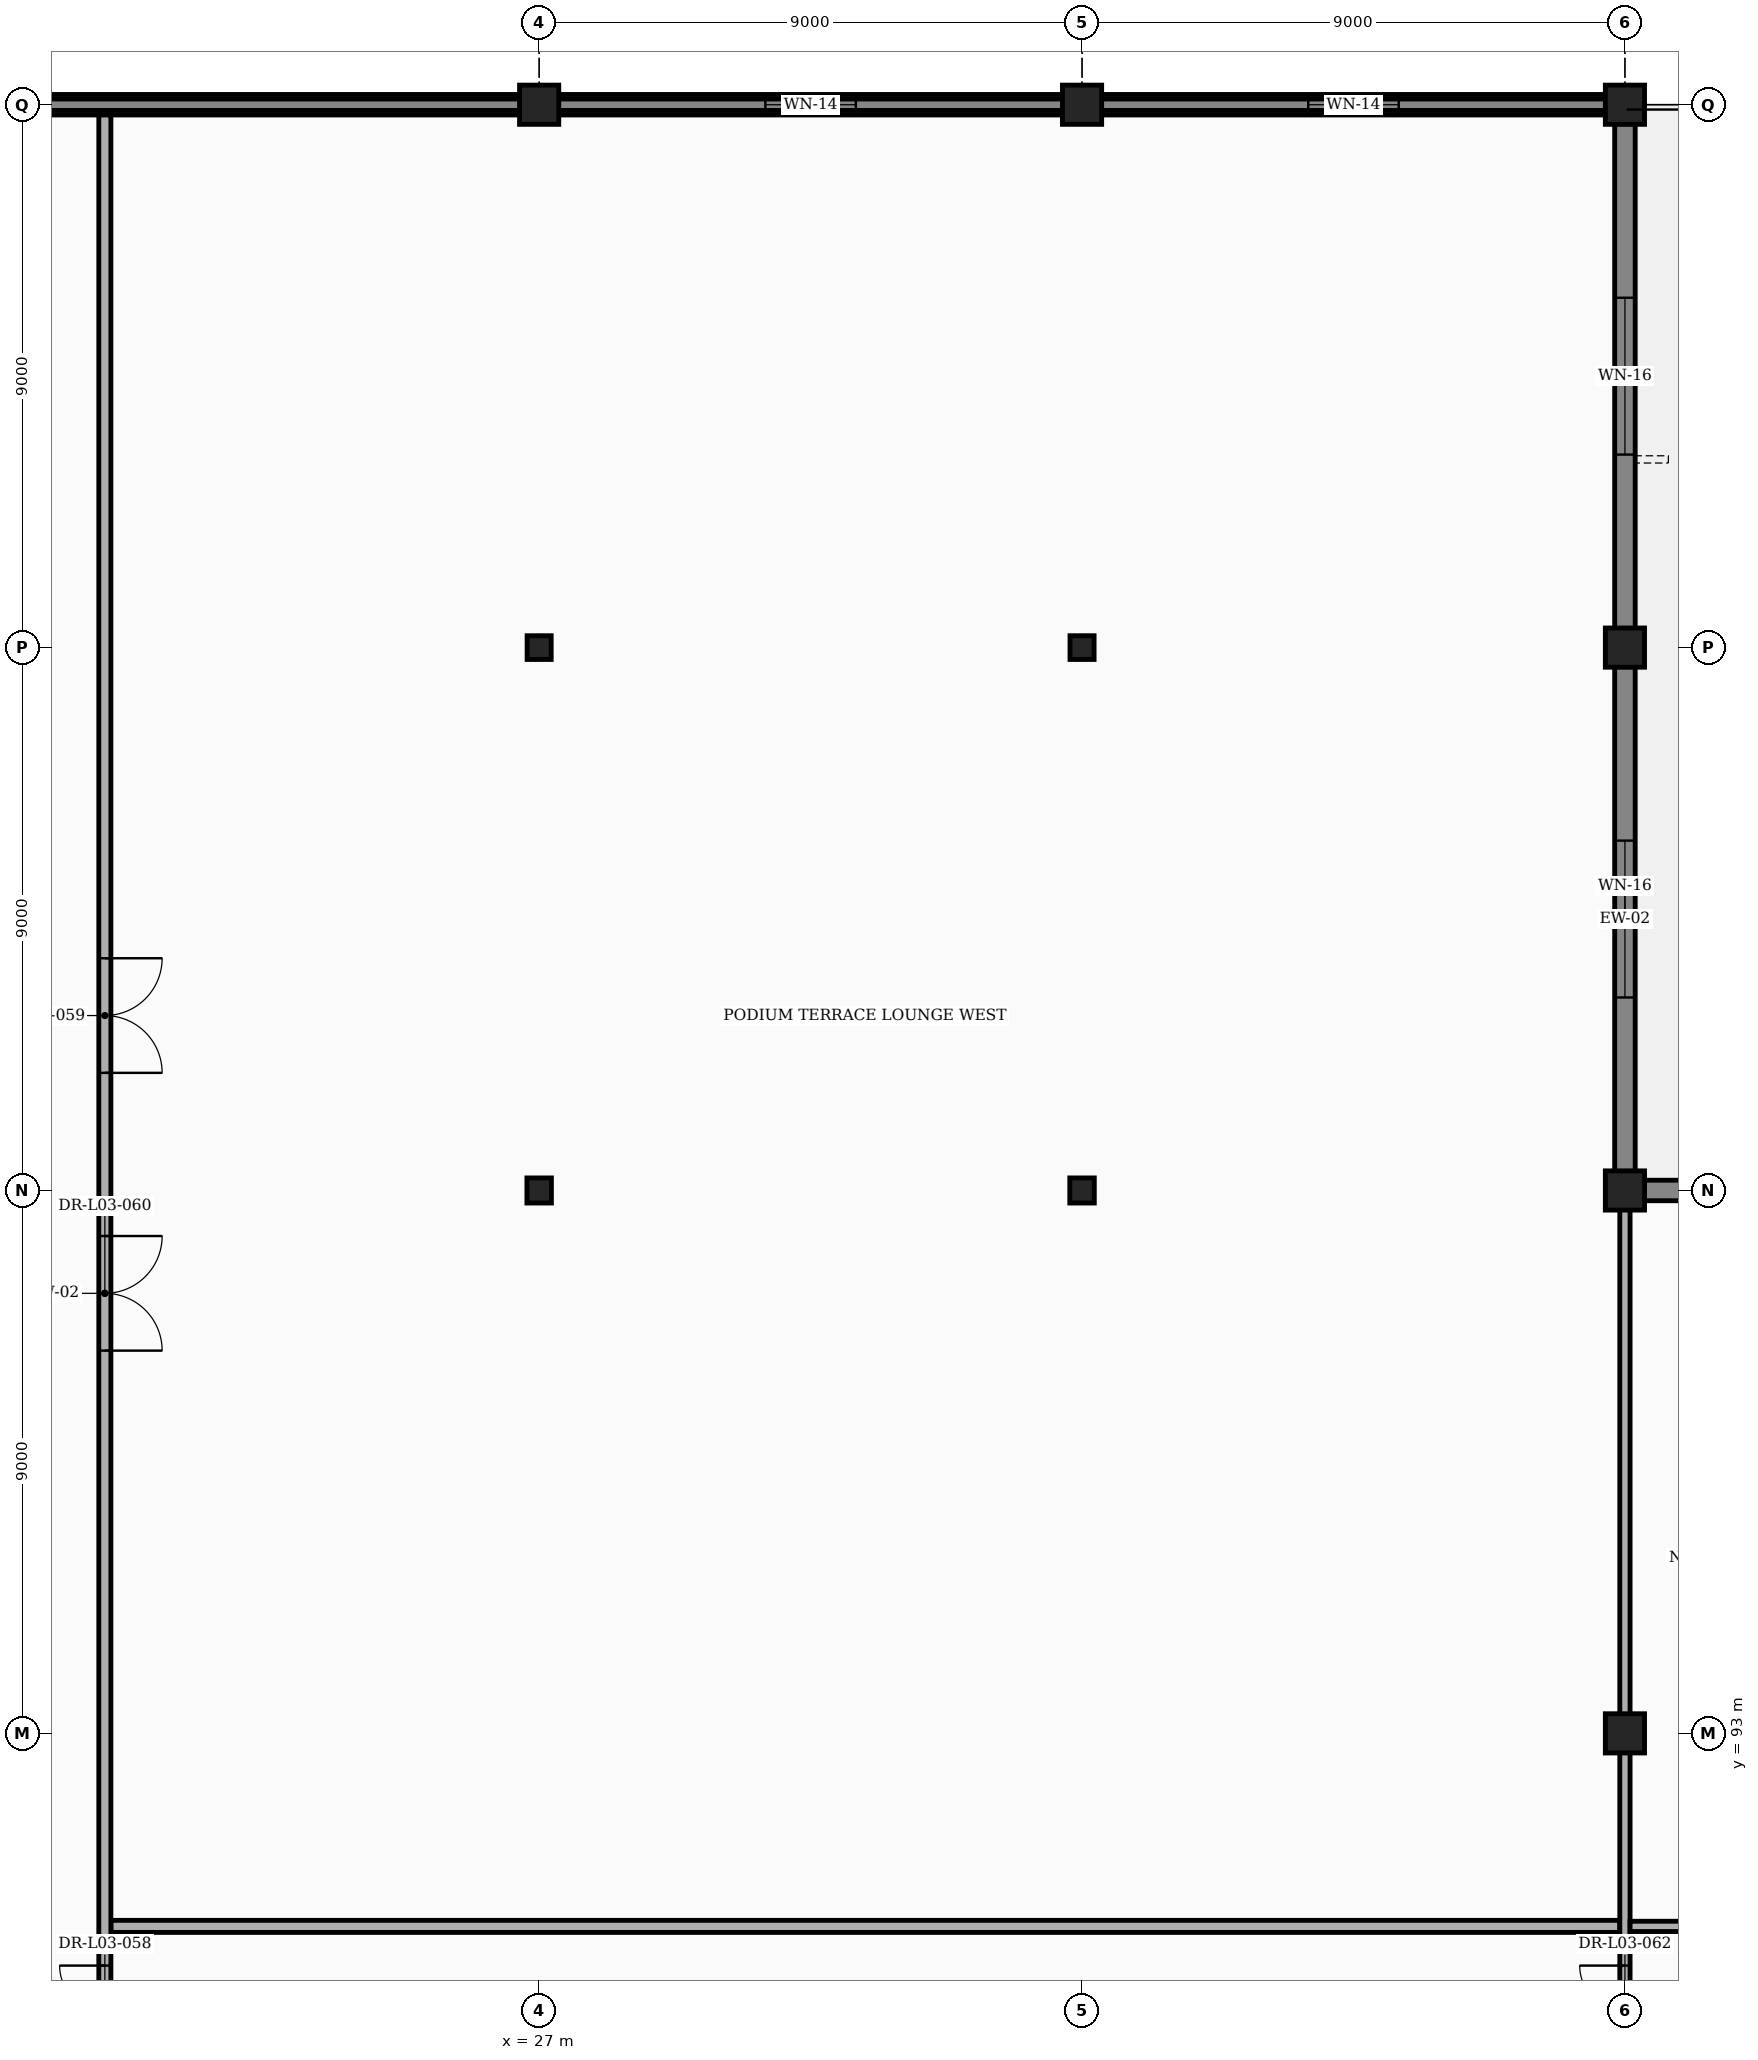
"""IFC4 building model, lengths in metres.
Left out: names, types, materials, properties, quantities, classifications, styles, units other than length and angle.
Written with IfcOpenShell. Run it as: python <this file> out.ifc"""

import sys

from ifc_helpers import new_model, si_unit, direction, frame, frame_2d, origin, origin_2d, place, context, subcontext, project, spatial, rectangle, i_section, extrude, element, fill, save


model = new_model("IFC4")
c1 = context("Model", 3, precision=1e-05, world=origin(), true_north=direction((0.0, 1.0)))
c2 = subcontext(c1, "Body", "Model", "MODEL_VIEW")
j1 = project(units=[si_unit("LENGTHUNIT", "METRE"), si_unit("PLANEANGLEUNIT", "RADIAN")], contexts=[c1])
p1 = place(None, origin())
s1 = spatial("IfcSite", under=j1, at=p1, CompositionType="ELEMENT")
p2 = place(p1, origin())
s2 = spatial("IfcBuilding", under=s1, at=p2, CompositionType="ELEMENT")
p3 = place(p2, frame((0.0, 0.0, 16.8)))
s3 = spatial("IfcBuildingStorey", under=s2, at=p3, CompositionType="ELEMENT", Elevation=16.8)
p4 = place(p3, frame((27.0, 102.0, 0.0), z_axis=(0.0, 0.0, 1.0), x_axis=(1.0, 0.0, 0.0)))
e1 = element("IfcColumn", 1, at=p4, inside=s3, PredefinedType="COLUMN", context=c2, shape_type="SweptSolid", body=[
    extrude(i_section(OverallWidth=0.406, OverallDepth=0.416, WebThickness=0.03, FlangeThickness=0.048, at=origin_2d()), origin(), (0.0, 0.0, 1.0), 4.8),
])
p5 = place(p3, frame((27.0, 111.0, 0.0), z_axis=(0.0, 0.0, 1.0), x_axis=(1.0, 0.0, 0.0)))
e2 = element("IfcColumn", 2, at=p5, inside=s3, PredefinedType="COLUMN", context=c2, shape_type="SweptSolid", body=[
    extrude(i_section(OverallWidth=0.399, OverallDepth=0.394, WebThickness=0.023, FlangeThickness=0.037, at=origin_2d()), origin(), (0.0, 0.0, 1.0), 4.8),
])
p6 = place(p3, frame((27.0, 120.0, 0.0), z_axis=(0.0, 0.0, 1.0), x_axis=(1.0, 0.0, 0.0)))
e3 = element("IfcColumn", 3, at=p6, inside=s3, PredefinedType="COLUMN", context=c2, shape_type="SweptSolid", body=[
    extrude(rectangle(XDim=0.65, YDim=0.65, at=origin_2d()), origin(), (0.0, 0.0, 1.0), 4.8),
])
p7 = place(p3, frame((36.0, 102.0, 0.0), z_axis=(0.0, 0.0, 1.0), x_axis=(1.0, 0.0, 0.0)))
e4 = element("IfcColumn", 4, at=p7, inside=s3, PredefinedType="COLUMN", context=c2, shape_type="SweptSolid", body=[
    extrude(i_section(OverallWidth=0.406, OverallDepth=0.416, WebThickness=0.03, FlangeThickness=0.048, at=origin_2d()), origin(), (0.0, 0.0, 1.0), 4.8),
])
p8 = place(p3, frame((36.0, 111.0, 0.0), z_axis=(0.0, 0.0, 1.0), x_axis=(1.0, 0.0, 0.0)))
e5 = element("IfcColumn", 5, at=p8, inside=s3, PredefinedType="COLUMN", context=c2, shape_type="SweptSolid", body=[
    extrude(i_section(OverallWidth=0.399, OverallDepth=0.394, WebThickness=0.023, FlangeThickness=0.037, at=origin_2d()), origin(), (0.0, 0.0, 1.0), 4.8),
])
for number, where, z_axis, x_axis in (
    (6, (36.0, 120.0, 0.0), (0.0, 0.0, 1.0), (1.0, 0.0, 0.0)),
    (7, (45.0, 93.0, 0.0), (0.0, 0.0, 1.0), (1.0, 0.0, 0.0)),
    (8, (45.0, 102.0, 0.0), (0.0, 0.0, 1.0), (1.0, 0.0, 0.0)),
    (9, (45.0, 111.0, 0.0), (0.0, 0.0, 1.0), (1.0, 0.0, 0.0)),
    (10, (45.0, 120.0, 0.0), (0.0, 0.0, 1.0), (1.0, 0.0, 0.0)),
):
    element("IfcColumn", number, at=place(p3, frame(where, z_axis=z_axis, x_axis=x_axis)), inside=s3, PredefinedType="COLUMN", context=c2, shape_type="SweptSolid", body=[
        extrude(rectangle(XDim=0.65, YDim=0.65, at=origin_2d()), origin(), (0.0, 0.0, 1.0), 4.8),
    ])
p9 = place(p3, frame((45.317, 102.0, 0.0), z_axis=(0.0, 0.0, 1.0), x_axis=(1.0, 0.0, 0.0)))
e11 = element("IfcWall", 11, at=p9, inside=s3, PredefinedType="STANDARD", context=c2, shape_type="SweptSolid", body=[
    extrude(rectangle(XDim=17.366, YDim=0.34, at=frame_2d((8.683, 0.0))), origin(), (0.0, 0.0, 1.0), 4.195),
])
p10 = place(p9, frame((7.933, 0.0, 0.85)))
e12 = element("IfcOpeningElement", 12, at=p10, cuts=e11, PredefinedType="OPENING", context=c2, shape_type="SweptSolid", body=[
    extrude(rectangle(XDim=1.5, YDim=1.8, at=frame_2d((0.75, 0.9))), frame((0.0, 0.182, 0.0), z_axis=(0.0, -1.0, 0.0), x_axis=(1.0, 0.0, 0.0)), (0.0, 0.0, 1.0), 0.364),
])
p11 = place(p9, frame((1.483, 0.0, 0.0)))
e13 = element("IfcOpeningElement", 13, at=p11, cuts=e11, PredefinedType="OPENING", context=c2, shape_type="SweptSolid", body=[
    extrude(rectangle(XDim=2.4, YDim=2.35, at=frame_2d((1.2, 1.175))), frame((0.0, 0.182, 0.0), z_axis=(0.0, -1.0, 0.0), x_axis=(1.0, 0.0, 0.0)), (0.0, 0.0, 1.0), 0.364),
])
p12 = place(p3, frame((9.317, 120.0, 0.0), z_axis=(0.0, 0.0, 1.0), x_axis=(1.0, 0.0, 0.0)))
e14 = element("IfcWall", 14, at=p12, inside=s3, PredefinedType="STANDARD", context=c2, shape_type="SweptSolid", body=[
    extrude(rectangle(XDim=17.366, YDim=0.34, at=frame_2d((8.683, 0.0))), origin(), (0.0, 0.0, 1.0), 4.048),
])
p13 = place(p12, frame((7.933, 0.0, 0.85)))
e15 = element("IfcOpeningElement", 15, at=p13, cuts=e14, PredefinedType="OPENING", context=c2, shape_type="SweptSolid", body=[
    extrude(rectangle(XDim=1.5, YDim=1.8, at=frame_2d((0.75, 0.9))), frame((0.0, 0.182, 0.0), z_axis=(0.0, -1.0, 0.0), x_axis=(1.0, 0.0, 0.0)), (0.0, 0.0, 1.0), 0.364),
])
p14 = place(p3, frame((27.317, 120.0, 0.0), z_axis=(0.0, 0.0, 1.0), x_axis=(1.0, 0.0, 0.0)))
e16 = element("IfcWall", 16, at=p14, inside=s3, PredefinedType="STANDARD", context=c2, shape_type="SweptSolid", body=[
    extrude(rectangle(XDim=8.366, YDim=0.34, at=frame_2d((4.183, 0.0))), origin(), (0.0, 0.0, 1.0), 4.048),
])
p15 = place(p14, frame((3.433, 0.0, 0.85)))
e17 = element("IfcOpeningElement", 17, at=p15, cuts=e16, PredefinedType="OPENING", context=c2, shape_type="SweptSolid", body=[
    extrude(rectangle(XDim=1.5, YDim=1.8, at=frame_2d((0.75, 0.9))), frame((0.0, 0.182, 0.0), z_axis=(0.0, -1.0, 0.0), x_axis=(1.0, 0.0, 0.0)), (0.0, 0.0, 1.0), 0.364),
])
p16 = place(p3, frame((36.317, 120.0, 0.0), z_axis=(0.0, 0.0, 1.0), x_axis=(1.0, 0.0, 0.0)))
e18 = element("IfcWall", 18, at=p16, inside=s3, PredefinedType="STANDARD", context=c2, shape_type="SweptSolid", body=[
    extrude(rectangle(XDim=8.366, YDim=0.34, at=frame_2d((4.183, 0.0))), origin(), (0.0, 0.0, 1.0), 4.048),
])
p17 = place(p16, frame((3.433, 0.0, 0.85)))
e19 = element("IfcOpeningElement", 19, at=p17, cuts=e18, PredefinedType="OPENING", context=c2, shape_type="SweptSolid", body=[
    extrude(rectangle(XDim=1.5, YDim=1.8, at=frame_2d((0.75, 0.9))), frame((0.0, 0.182, 0.0), z_axis=(0.0, -1.0, 0.0), x_axis=(1.0, 0.0, 0.0)), (0.0, 0.0, 1.0), 0.364),
])
p18 = place(p3, frame((45.0, 102.317, 0.0), z_axis=(0.0, 0.0, 1.0), x_axis=(0.0, 1.0, 0.0)))
e20 = element("IfcWall", 20, at=p18, inside=s3, PredefinedType="STANDARD", context=c2, shape_type="SweptSolid", body=[
    extrude(rectangle(XDim=8.366, YDim=0.34, at=frame_2d((4.183, 0.0))), origin(), (0.0, 0.0, 1.0), 4.555),
])
p19 = place(p18, frame((2.883, 0.0, 0.85)))
e21 = element("IfcOpeningElement", 21, at=p19, cuts=e20, PredefinedType="OPENING", context=c2, shape_type="SweptSolid", body=[
    extrude(rectangle(XDim=2.6, YDim=2.2, at=frame_2d((1.3, 1.1))), frame((0.0, 0.182, 0.0), z_axis=(0.0, -1.0, 0.0), x_axis=(1.0, 0.0, 0.0)), (0.0, 0.0, 1.0), 0.364),
])
p20 = place(p3, frame((45.0, 111.317, 0.0), z_axis=(0.0, 0.0, 1.0), x_axis=(0.0, 1.0, 0.0)))
e22 = element("IfcWall", 22, at=p20, inside=s3, PredefinedType="STANDARD", context=c2, shape_type="SweptSolid", body=[
    extrude(rectangle(XDim=8.366, YDim=0.34, at=frame_2d((4.183, 0.0))), origin(), (0.0, 0.0, 1.0), 4.048),
])
p21 = place(p20, frame((2.883, 0.0, 0.85)))
e23 = element("IfcOpeningElement", 23, at=p21, cuts=e22, PredefinedType="OPENING", context=c2, shape_type="SweptSolid", body=[
    extrude(rectangle(XDim=2.6, YDim=2.2, at=frame_2d((1.3, 1.1))), frame((0.0, 0.182, 0.0), z_axis=(0.0, -1.0, 0.0), x_axis=(1.0, 0.0, 0.0)), (0.0, 0.0, 1.0), 0.364),
])
p22 = place(p3, frame((0.0, 120.0, 4.8), z_axis=(0.0, 0.0, 1.0), x_axis=(1.0, 0.0, 0.0)))
e24 = element("IfcWall", 24, at=p22, inside=s3, PredefinedType="PARAPET", context=c2, shape_type="SweptSolid", body=[
    extrude(rectangle(XDim=45.0, YDim=0.19, at=frame_2d((22.5, 0.0))), origin(), (0.0, 0.0, 1.0), 1.2),
])
p23 = place(p3, frame((19.9, 89.8, 0.0), z_axis=(0.0, 0.0, 1.0), x_axis=(1.0, 0.0, 0.0)))
e25 = element("IfcWall", 25, at=p23, inside=s3, PredefinedType="PARTITIONING", context=c2, shape_type="SweptSolid", body=[
    extrude(rectangle(XDim=25.015, YDim=0.2, at=frame_2d((12.508, 0.0))), origin(), (0.0, 0.0, 1.0), 4.555),
])
p24 = place(p3, frame((19.8, 80.76, 0.0), z_axis=(0.0, 0.0, 1.0), x_axis=(0.0, 1.0, 0.0)))
e26 = element("IfcWall", 26, at=p24, inside=s3, PredefinedType="PARTITIONING", context=c2, shape_type="SweptSolid", body=[
    extrude(rectangle(XDim=39.07, YDim=0.2, at=frame_2d((19.535, 0.0))), origin(), (0.0, 0.0, 1.0), 4.555),
])
p25 = place(p24, frame((1.1, 0.0, 0.0)))
e27 = element("IfcOpeningElement", 27, at=p25, cuts=e26, PredefinedType="OPENING", context=c2, shape_type="SweptSolid", body=[
    extrude(rectangle(XDim=1.15, YDim=2.15, at=frame_2d((0.575, 1.075))), frame((0.0, 0.112, 0.0), z_axis=(0.0, -1.0, 0.0), x_axis=(1.0, 0.0, 0.0)), (0.0, 0.0, 1.0), 0.224),
])
p26 = place(p24, frame((6.89, 0.0, 0.0)))
e28 = element("IfcOpeningElement", 28, at=p26, cuts=e26, PredefinedType="OPENING", context=c2, shape_type="SweptSolid", body=[
    extrude(rectangle(XDim=1.5, YDim=2.2, at=frame_2d((0.75, 1.1))), frame((0.0, 0.112, 0.0), z_axis=(0.0, -1.0, 0.0), x_axis=(1.0, 0.0, 0.0)), (0.0, 0.0, 1.0), 0.224),
])
p27 = place(p24, frame((23.19, 0.0, 0.0)))
e29 = element("IfcOpeningElement", 29, at=p27, cuts=e26, PredefinedType="OPENING", context=c2, shape_type="SweptSolid", body=[
    extrude(rectangle(XDim=1.9, YDim=2.35, at=frame_2d((0.95, 1.175))), frame((0.0, 0.112, 0.0), z_axis=(0.0, -1.0, 0.0), x_axis=(1.0, 0.0, 0.0)), (0.0, 0.0, 1.0), 0.224),
])
p28 = place(p24, frame((18.585, 0.0, 0.0)))
e30 = element("IfcOpeningElement", 30, at=p28, cuts=e26, PredefinedType="OPENING", context=c2, shape_type="SweptSolid", body=[
    extrude(rectangle(XDim=1.9, YDim=2.35, at=frame_2d((0.95, 1.175))), frame((0.0, 0.112, 0.0), z_axis=(0.0, -1.0, 0.0), x_axis=(1.0, 0.0, 0.0)), (0.0, 0.0, 1.0), 0.224),
])
p29 = place(p3, frame((45.0, 84.22, 0.0), z_axis=(0.0, 0.0, 1.0), x_axis=(0.0, 1.0, 0.0)))
e31 = element("IfcWall", 31, at=p29, inside=s3, PredefinedType="PARTITIONING", context=c2, shape_type="SweptSolid", body=[
    extrude(rectangle(XDim=8.56, YDim=0.17, at=frame_2d((4.28, 0.0))), origin(), (0.0, 0.0, 1.0), 4.258),
])
p30 = place(p29, frame((3.43, 0.0, 0.0)))
e32 = element("IfcOpeningElement", 32, at=p30, cuts=e31, PredefinedType="OPENING", context=c2, shape_type="SweptSolid", body=[
    extrude(rectangle(XDim=1.5, YDim=2.2, at=frame_2d((0.75, 1.1))), frame((0.0, 0.097, 0.0), z_axis=(0.0, -1.0, 0.0), x_axis=(1.0, 0.0, 0.0)), (0.0, 0.0, 1.0), 0.194),
])
p31 = place(p29, frame((0.85, 0.0, 0.0)))
e33 = element("IfcOpeningElement", 33, at=p31, cuts=e31, PredefinedType="OPENING", context=c2, shape_type="SweptSolid", body=[
    extrude(rectangle(XDim=1.45, YDim=2.2, at=frame_2d((0.725, 1.1))), frame((0.0, 0.097, 0.0), z_axis=(0.0, -1.0, 0.0), x_axis=(1.0, 0.0, 0.0)), (0.0, 0.0, 1.0), 0.194),
])
p32 = place(p3, frame((45.0, 93.22, 0.0), z_axis=(0.0, 0.0, 1.0), x_axis=(0.0, 1.0, 0.0)))
e34 = element("IfcWall", 34, at=p32, inside=s3, PredefinedType="PARTITIONING", context=c2, shape_type="SweptSolid", body=[
    extrude(rectangle(XDim=8.56, YDim=0.17, at=frame_2d((4.28, 0.0))), origin(), (0.0, 0.0, 1.0), 4.002),
])
p33 = place(p3, frame((45.085, 89.8, 0.0), z_axis=(0.0, 0.0, 1.0), x_axis=(1.0, 0.0, 0.0)))
e35 = element("IfcWall", 35, at=p33, inside=s3, PredefinedType="PARTITIONING", context=c2, shape_type="SweptSolid", body=[
    extrude(rectangle(XDim=5.755, YDim=0.17, at=frame_2d((2.877, 0.0))), origin(), (0.0, 0.0, 1.0), 4.555),
])
p34 = place(p33, frame((1.928, 0.0, 0.0)))
e36 = element("IfcOpeningElement", 36, at=p34, cuts=e35, PredefinedType="OPENING", context=c2, shape_type="SweptSolid", body=[
    extrude(rectangle(XDim=1.9, YDim=2.35, at=frame_2d((0.95, 1.175))), frame((0.0, 0.097, 0.0), z_axis=(0.0, -1.0, 0.0), x_axis=(1.0, 0.0, 0.0)), (0.0, 0.0, 1.0), 0.194),
])
p35 = place(p15, origin())
e37 = element("IfcWindow", 37, at=p35, inside=s3, PartitioningType="SINGLE_PANEL", PredefinedType="WINDOW", context=c2, shape_type="SweptSolid", body=[
    extrude(rectangle(XDim=1.5, YDim=1.8, at=frame_2d((0.75, 0.9))), frame((0.0, 0.03, 0.0), z_axis=(0.0, -1.0, 0.0), x_axis=(1.0, 0.0, 0.0)), (0.0, 0.0, 1.0), 0.06),
])
fill(e17, e37)
p36 = place(p17, origin())
e38 = element("IfcWindow", 38, at=p36, inside=s3, PartitioningType="SINGLE_PANEL", PredefinedType="WINDOW", context=c2, shape_type="SweptSolid", body=[
    extrude(rectangle(XDim=1.5, YDim=1.8, at=frame_2d((0.75, 0.9))), frame((0.0, 0.03, 0.0), z_axis=(0.0, -1.0, 0.0), x_axis=(1.0, 0.0, 0.0)), (0.0, 0.0, 1.0), 0.06),
])
fill(e19, e38)
p37 = place(p19, origin())
e39 = element("IfcWindow", 39, at=p37, inside=s3, PartitioningType="SINGLE_PANEL", PredefinedType="WINDOW", context=c2, shape_type="SweptSolid", body=[
    extrude(rectangle(XDim=2.6, YDim=2.2, at=frame_2d((1.3, 1.1))), frame((0.0, 0.03, 0.0), z_axis=(0.0, -1.0, 0.0), x_axis=(1.0, 0.0, 0.0)), (0.0, 0.0, 1.0), 0.06),
])
fill(e21, e39)
p38 = place(p21, origin())
e40 = element("IfcWindow", 40, at=p38, inside=s3, PartitioningType="SINGLE_PANEL", PredefinedType="WINDOW", context=c2, shape_type="SweptSolid", body=[
    extrude(rectangle(XDim=2.6, YDim=2.2, at=frame_2d((1.3, 1.1))), frame((0.0, 0.03, 0.0), z_axis=(0.0, -1.0, 0.0), x_axis=(1.0, 0.0, 0.0)), (0.0, 0.0, 1.0), 0.06),
])
fill(e23, e40)
p39 = place(p26, origin())
e41 = element("IfcDoor", 41, at=p39, inside=s3, OperationType="DOUBLE_DOOR_SINGLE_SWING", PredefinedType="DOOR", context=c2, shape_type="SweptSolid", body=[
    extrude(rectangle(XDim=1.5, YDim=2.2, at=frame_2d((0.75, 1.1))), frame((0.0, 0.025, 0.0), z_axis=(0.0, -1.0, 0.0), x_axis=(1.0, 0.0, 0.0)), (0.0, 0.0, 1.0), 0.05),
])
fill(e28, e41)
p40 = place(p27, frame((1.9, 0.0, 0.0), z_axis=(0.0, 0.0, 1.0), x_axis=(-1.0, 0.0, 0.0)))
e42 = element("IfcDoor", 42, at=p40, inside=s3, OperationType="DOUBLE_DOOR_SINGLE_SWING", PredefinedType="DOOR", context=c2, shape_type="SweptSolid", body=[
    extrude(rectangle(XDim=1.9, YDim=2.35, at=frame_2d((0.95, 1.175))), frame((0.0, 0.025, 0.0), z_axis=(0.0, -1.0, 0.0), x_axis=(1.0, 0.0, 0.0)), (0.0, 0.0, 1.0), 0.05),
])
fill(e29, e42)
p41 = place(p28, frame((1.9, 0.0, 0.0), z_axis=(0.0, 0.0, 1.0), x_axis=(-1.0, 0.0, 0.0)))
e43 = element("IfcDoor", 43, at=p41, inside=s3, OperationType="DOUBLE_DOOR_SINGLE_SWING", PredefinedType="DOOR", context=c2, shape_type="SweptSolid", body=[
    extrude(rectangle(XDim=1.9, YDim=2.35, at=frame_2d((0.95, 1.175))), frame((0.0, 0.025, 0.0), z_axis=(0.0, -1.0, 0.0), x_axis=(1.0, 0.0, 0.0)), (0.0, 0.0, 1.0), 0.05),
])
fill(e30, e43)
p42 = place(p30, origin())
e44 = element("IfcDoor", 44, at=p42, inside=s3, OperationType="DOUBLE_DOOR_SINGLE_SWING", PredefinedType="DOOR", context=c2, shape_type="SweptSolid", body=[
    extrude(rectangle(XDim=1.5, YDim=2.2, at=frame_2d((0.75, 1.1))), frame((0.0, 0.025, 0.0), z_axis=(0.0, -1.0, 0.0), x_axis=(1.0, 0.0, 0.0)), (0.0, 0.0, 1.0), 0.05),
])
fill(e32, e44)
save(model, sys.argv[1])
